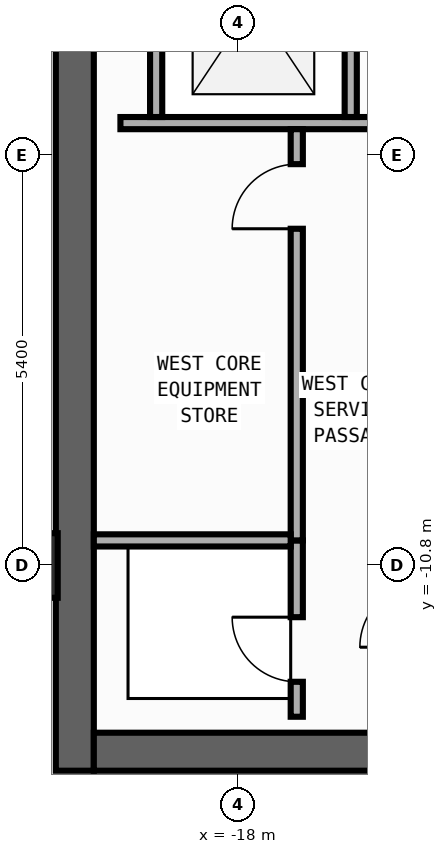
"""IFC4 building model, lengths in metres.
Left out: names, types, materials, properties, quantities, classifications, styles, units other than length and angle.
Written with IfcOpenShell. Run it as: python <this file> out.ifc"""

import sys

from ifc_helpers import new_model, si_unit, direction, frame, frame_2d, origin, origin_2d, place, context, subcontext, project, spatial, rectangle, extrude, element, fill, save


model = new_model("IFC4")
c1 = context("Model", 3, precision=1e-05, world=origin(), true_north=direction((0.0, 1.0)))
c2 = subcontext(c1, "Body", "Model", "MODEL_VIEW")
j1 = project(units=[si_unit("LENGTHUNIT", "METRE"), si_unit("PLANEANGLEUNIT", "RADIAN")], contexts=[c1])
p1 = place(None, origin())
s1 = spatial("IfcSite", under=j1, at=p1, CompositionType="ELEMENT")
p2 = place(p1, origin())
s2 = spatial("IfcBuilding", under=s1, at=p2, CompositionType="ELEMENT")
p3 = place(p2, frame((0.0, 0.0, 240.4)))
s3 = spatial("IfcBuildingStorey", under=s2, at=p3, CompositionType="ELEMENT", Elevation=240.4)
p4 = place(p3, frame((-20.15, -13.5, 0.0), z_axis=(0.0, 0.0, 1.0), x_axis=(0.0, 1.0, 0.0)))
e1 = element("IfcWall", 1, at=p4, inside=s3, PredefinedType="SHEAR", context=c2, shape_type="SweptSolid", body=[
    extrude(rectangle(XDim=27.0, YDim=0.5, at=frame_2d((13.5, 0.0))), origin(), (0.0, 0.0, 1.0), 3.34),
])
p5 = place(p3, frame((-19.9, -13.25, 0.0), z_axis=(0.0, 0.0, 1.0), x_axis=(1.0, 0.0, 0.0)))
e2 = element("IfcWall", 2, at=p5, inside=s3, PredefinedType="SHEAR", context=c2, shape_type="SweptSolid", body=[
    extrude(rectangle(XDim=7.4, YDim=0.5, at=frame_2d((3.7, 0.0))), origin(), (0.0, 0.0, 1.0), 3.34),
])
p6 = place(p3, frame((-20.8, -10.8, 0.0), z_axis=(0.0, 0.0, 1.0), x_axis=(1.0, 0.0, 0.0)))
e3 = element("IfcColumn", 3, at=p6, inside=s3, PredefinedType="COLUMN", context=c2, shape_type="SweptSolid", body=[
    extrude(rectangle(XDim=0.85, YDim=0.85, at=origin_2d()), origin(), (0.0, 0.0, 1.0), 3.6),
])
p7 = place(p3, frame((-19.55, -4.98, 0.0), z_axis=(0.0, 0.0, 1.0), x_axis=(1.0, 0.0, 0.0)))
e4 = element("IfcWall", 4, at=p7, inside=s3, PredefinedType="STANDARD", context=c2, shape_type="SweptSolid", body=[
    extrude(rectangle(XDim=3.8, YDim=0.16, at=frame_2d((1.9, 0.0))), origin(), (0.0, 0.0, 1.0), 3.34),
])
for number, where, z_axis, x_axis in (
    (5, (-19.08, -4.9, 0.0), (0.0, 0.0, 1.0), (0.0, 1.0, 0.0)),
    (6, (-16.52, -4.9, 0.0), (0.0, 0.0, 1.0), (0.0, 1.0, 0.0)),
):
    element("IfcWall", number, at=place(p3, frame(where, z_axis=z_axis, x_axis=x_axis)), inside=s3, PredefinedType="STANDARD", context=c2, shape_type="SweptSolid", body=[
        extrude(rectangle(XDim=2.96, YDim=0.16, at=frame_2d((1.48, 0.0))), origin(), (0.0, 0.0, 1.0), 3.34),
    ])
p8 = place(p3, frame((-17.23, -12.79, 0.0), z_axis=(0.0, 0.0, 1.0), x_axis=(0.0, 1.0, 0.0)))
e7 = element("IfcWall", 7, at=p8, inside=s3, PredefinedType="PARTITIONING", context=c2, shape_type="SweptSolid", body=[
    extrude(rectangle(XDim=2.32, YDim=0.16, at=frame_2d((1.16, 0.0))), origin(), (0.0, 0.0, 1.0), 3.34),
])
p9 = place(p8, frame((0.46, 0.0, 0.0)))
e8 = element("IfcOpeningElement", 8, at=p9, cuts=e7, PredefinedType="OPENING", context=c2, shape_type="SweptSolid", body=[
    extrude(rectangle(XDim=0.85, YDim=2.1, at=frame_2d((0.425, 1.05))), frame((0.0, 0.09, 0.0), z_axis=(0.0, -1.0, 0.0), x_axis=(1.0, 0.0, 0.0)), (0.0, 0.0, 1.0), 0.18),
])
p10 = place(p3, frame((-17.23, -10.47, 0.0), z_axis=(0.0, 0.0, 1.0), x_axis=(0.0, 1.0, 0.0)))
e9 = element("IfcWall", 9, at=p10, inside=s3, PredefinedType="PARTITIONING", context=c2, shape_type="SweptSolid", body=[
    extrude(rectangle(XDim=5.41, YDim=0.16, at=frame_2d((2.705, 0.0))), origin(), (0.0, 0.0, 1.0), 3.34),
])
p11 = place(p10, frame((4.1, 0.0, 0.0)))
e10 = element("IfcOpeningElement", 10, at=p11, cuts=e9, PredefinedType="OPENING", context=c2, shape_type="SweptSolid", body=[
    extrude(rectangle(XDim=0.85, YDim=2.1, at=frame_2d((0.425, 1.05))), frame((0.0, 0.09, 0.0), z_axis=(0.0, -1.0, 0.0), x_axis=(1.0, 0.0, 0.0)), (0.0, 0.0, 1.0), 0.18),
])
p12 = place(p3, frame((-19.9, -10.47, 0.0), z_axis=(0.0, 0.0, 1.0), x_axis=(1.0, 0.0, 0.0)))
e11 = element("IfcWall", 11, at=p12, inside=s3, PredefinedType="PARTITIONING", context=c2, shape_type="SweptSolid", body=[
    extrude(rectangle(XDim=2.59, YDim=0.16, at=frame_2d((1.295, 0.0))), origin(), (0.0, 0.0, 1.0), 3.34),
])
p13 = place(p9, origin())
e12 = element("IfcDoor", 12, at=p13, inside=s3, OperationType="SINGLE_SWING_RIGHT", PredefinedType="DOOR", context=c2, shape_type="SweptSolid", body=[
    extrude(rectangle(XDim=0.85, YDim=2.1, at=frame_2d((0.425, 1.05))), frame((0.0, 0.025, 0.0), z_axis=(0.0, -1.0, 0.0), x_axis=(1.0, 0.0, 0.0)), (0.0, 0.0, 1.0), 0.05),
])
fill(e8, e12)
p14 = place(p11, origin())
e13 = element("IfcDoor", 13, at=p14, inside=s3, OperationType="SINGLE_SWING_LEFT", PredefinedType="DOOR", context=c2, shape_type="SweptSolid", body=[
    extrude(rectangle(XDim=0.85, YDim=2.1, at=frame_2d((0.425, 1.05))), frame((0.0, 0.025, 0.0), z_axis=(0.0, -1.0, 0.0), x_axis=(1.0, 0.0, 0.0)), (0.0, 0.0, 1.0), 0.05),
])
fill(e10, e13)
save(model, sys.argv[1])
